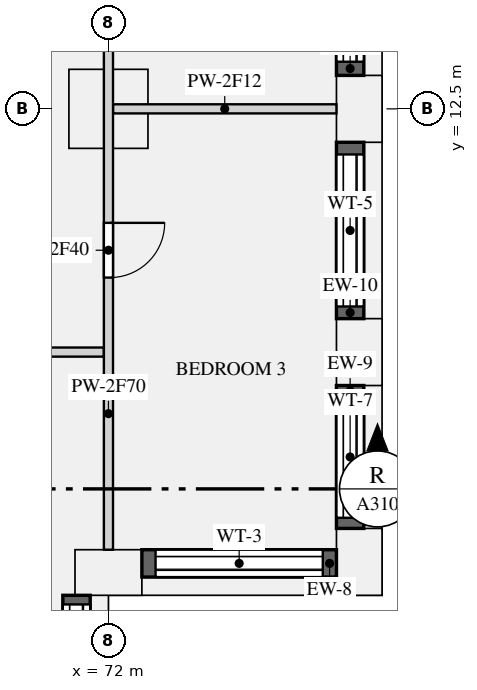
"""IFC4 building model, lengths in metres.
Left out: names, types, materials, properties, quantities, classifications, styles, units other than length and angle.
Written with IfcOpenShell. Run it as: python <this file> out.ifc"""

import sys

from ifc_helpers import new_model, si_unit, direction, frame, frame_2d, origin, origin_2d, place, context, subcontext, project, spatial, rectangle, extrude, element, fill, save


model = new_model("IFC4")
c1 = context("Model", 3, precision=1e-05, world=origin(), true_north=direction((0.0, 1.0)))
c2 = subcontext(c1, "Body", "Model", "MODEL_VIEW")
j1 = project(units=[si_unit("LENGTHUNIT", "METRE"), si_unit("PLANEANGLEUNIT", "RADIAN")], contexts=[c1])
p1 = place(None, origin())
s1 = spatial("IfcSite", under=j1, at=p1, CompositionType="ELEMENT")
p2 = place(p1, origin())
s2 = spatial("IfcBuilding", under=s1, at=p2, CompositionType="ELEMENT")
p3 = place(p2, frame((0.0, 0.0, 127.65)))
s3 = spatial("IfcBuildingStorey", under=s2, at=p3, CompositionType="ELEMENT", Elevation=127.65)
for number, where, z_axis, x_axis in (
    (1, (72.0, 4.875, 0.0), (0.0, 0.0, 1.0), (1.0, 0.0, 0.0)),
    (2, (76.125, 5.05, 0.0), (0.0, 0.0, 1.0), (0.0, 1.0, 0.0)),
    (3, (76.125, 8.5, 0.0), (0.0, 0.0, 1.0), (0.0, 1.0, 0.0)),
    (4, (76.125, 12.5, 0.0), (0.0, 0.0, 1.0), (0.0, 1.0, 0.0)),
):
    element("IfcColumn", number, at=place(p3, frame(where, z_axis=z_axis, x_axis=x_axis)), inside=s3, PredefinedType="USERDEFINED", context=c2, shape_type="SweptSolid", body=[
        extrude(rectangle(XDim=1.1, YDim=0.75, at=origin_2d()), origin(), (0.0, 0.0, 1.0), 3.15),
    ])
p4 = place(p3, frame((72.0, 12.5, 0.0), z_axis=(0.0, 0.0, 1.0), x_axis=(1.0, 0.0, 0.0)))
e5 = element("IfcColumn", 5, at=p4, inside=s3, PredefinedType="COLUMN", context=c2, shape_type="SweptSolid", body=[
    extrude(rectangle(XDim=1.3, YDim=1.3, at=origin_2d()), origin(), (0.0, 0.0, 1.0), 3.15),
])
p5 = place(p3, frame((71.475, 1.1, 0.9), z_axis=(0.0, 0.0, 1.0), x_axis=(0.0, 1.0, 0.0)))
e6 = element("IfcWall", 6, at=p5, inside=s3, PredefinedType="SOLIDWALL", context=c2, shape_type="SweptSolid", body=[
    extrude(rectangle(XDim=3.4, YDim=0.45, at=frame_2d((1.7, 0.0))), origin(), (0.0, 0.0, 1.0), 1.75),
])
p6 = place(p5, frame((0.15, 0.0, 0.15)))
e7 = element("IfcOpeningElement", 7, at=p6, cuts=e6, PredefinedType="OPENING", context=c2, shape_type="SweptSolid", body=[
    extrude(rectangle(XDim=3.1, YDim=1.5, at=frame_2d((1.55, 0.75))), frame((0.0, 0.235, 0.0), z_axis=(0.0, -1.0, 0.0), x_axis=(1.0, 0.0, 0.0)), (0.0, 0.0, 1.0), 0.47),
])
p7 = place(p3, frame((72.55, 5.025, 0.9), z_axis=(0.0, 0.0, 1.0), x_axis=(1.0, 0.0, 0.0)))
e8 = element("IfcWall", 8, at=p7, inside=s3, PredefinedType="SOLIDWALL", context=c2, shape_type="SweptSolid", body=[
    extrude(rectangle(XDim=3.2, YDim=0.45, at=frame_2d((1.6, 0.0))), origin(), (0.0, 0.0, 1.0), 1.75),
])
p8 = place(p7, frame((0.225, 0.0, 0.15)))
e9 = element("IfcOpeningElement", 9, at=p8, cuts=e8, PredefinedType="OPENING", context=c2, shape_type="SweptSolid", body=[
    extrude(rectangle(XDim=2.75, YDim=1.5, at=frame_2d((1.375, 0.75))), frame((0.0, 0.235, 0.0), z_axis=(0.0, -1.0, 0.0), x_axis=(1.0, 0.0, 0.0)), (0.0, 0.0, 1.0), 0.47),
])
p9 = place(p3, frame((75.975, 5.6, 0.9), z_axis=(0.0, 0.0, 1.0), x_axis=(0.0, 1.0, 0.0)))
e10 = element("IfcWall", 10, at=p9, inside=s3, PredefinedType="SOLIDWALL", context=c2, shape_type="SweptSolid", body=[
    extrude(rectangle(XDim=2.35, YDim=0.45, at=frame_2d((1.175, 0.0))), origin(), (0.0, 0.0, 1.0), 1.75),
])
p10 = place(p9, frame((0.175, 0.0, 0.15)))
e11 = element("IfcOpeningElement", 11, at=p10, cuts=e10, PredefinedType="OPENING", context=c2, shape_type="SweptSolid", body=[
    extrude(rectangle(XDim=2.0, YDim=1.5, at=frame_2d((1.0, 0.75))), frame((0.0, 0.235, 0.0), z_axis=(0.0, -1.0, 0.0), x_axis=(1.0, 0.0, 0.0)), (0.0, 0.0, 1.0), 0.47),
])
p11 = place(p3, frame((75.975, 9.05, 0.9), z_axis=(0.0, 0.0, 1.0), x_axis=(0.0, 1.0, 0.0)))
e12 = element("IfcWall", 12, at=p11, inside=s3, PredefinedType="SOLIDWALL", context=c2, shape_type="SweptSolid", body=[
    extrude(rectangle(XDim=2.9, YDim=0.45, at=frame_2d((1.45, 0.0))), origin(), (0.0, 0.0, 1.0), 1.75),
])
p12 = place(p11, frame((0.2, 0.0, 0.15)))
e13 = element("IfcOpeningElement", 13, at=p12, cuts=e12, PredefinedType="OPENING", context=c2, shape_type="SweptSolid", body=[
    extrude(rectangle(XDim=2.5, YDim=1.5, at=frame_2d((1.25, 0.75))), frame((0.0, 0.235, 0.0), z_axis=(0.0, -1.0, 0.0), x_axis=(1.0, 0.0, 0.0)), (0.0, 0.0, 1.0), 0.47),
])
p13 = place(p3, frame((75.975, 13.05, 0.9), z_axis=(0.0, 0.0, 1.0), x_axis=(0.0, 1.0, 0.0)))
e14 = element("IfcWall", 14, at=p13, inside=s3, PredefinedType="SOLIDWALL", context=c2, shape_type="SweptSolid", body=[
    extrude(rectangle(XDim=2.7, YDim=0.45, at=frame_2d((1.35, 0.0))), origin(), (0.0, 0.0, 1.0), 1.75),
])
p14 = place(p13, frame((0.225, 0.0, 0.15)))
e15 = element("IfcOpeningElement", 15, at=p14, cuts=e14, PredefinedType="OPENING", context=c2, shape_type="SweptSolid", body=[
    extrude(rectangle(XDim=2.25, YDim=1.5, at=frame_2d((1.125, 0.75))), frame((0.0, 0.235, 0.0), z_axis=(0.0, -1.0, 0.0), x_axis=(1.0, 0.0, 0.0)), (0.0, 0.0, 1.0), 0.47),
])
p15 = place(p3, frame((72.075, 12.5, 0.0), z_axis=(0.0, 0.0, 1.0), x_axis=(1.0, 0.0, 0.0)))
e16 = element("IfcWall", 16, at=p15, inside=s3, PredefinedType="PARTITIONING", context=c2, shape_type="SweptSolid", body=[
    extrude(rectangle(XDim=3.675, YDim=0.15, at=frame_2d((1.837, 0.0))), origin(), (0.0, 0.0, 1.0), 2.65),
])
p16 = place(p3, frame((54.0, 8.5, 0.0), z_axis=(0.0, 0.0, 1.0), x_axis=(1.0, 0.0, 0.0)))
e17 = element("IfcWall", 17, at=p16, inside=s3, PredefinedType="PARTITIONING", context=c2, shape_type="SweptSolid", body=[
    extrude(rectangle(XDim=17.925, YDim=0.15, at=frame_2d((8.962, 0.0))), origin(), (0.0, 0.0, 1.0), 2.65),
])
p17 = place(p16, frame((1.8, 0.0, 0.0)))
e18 = element("IfcOpeningElement", 18, at=p17, cuts=e17, PredefinedType="OPENING", context=c2, shape_type="SweptSolid", body=[
    extrude(rectangle(XDim=0.9, YDim=2.1, at=frame_2d((0.45, 1.05))), frame((0.0, 0.085, 0.0), z_axis=(0.0, -1.0, 0.0), x_axis=(1.0, 0.0, 0.0)), (0.0, 0.0, 1.0), 0.17),
])
p18 = place(p16, frame((12.75, 0.0, 0.0)))
e19 = element("IfcOpeningElement", 19, at=p18, cuts=e17, PredefinedType="OPENING", context=c2, shape_type="SweptSolid", body=[
    extrude(rectangle(XDim=1.5, YDim=2.1, at=frame_2d((0.75, 1.05))), frame((0.0, 0.085, 0.0), z_axis=(0.0, -1.0, 0.0), x_axis=(1.0, 0.0, 0.0)), (0.0, 0.0, 1.0), 0.17),
])
p19 = place(p16, frame((6.3, 0.0, 0.0)))
e20 = element("IfcOpeningElement", 20, at=p19, cuts=e17, PredefinedType="OPENING", context=c2, shape_type="SweptSolid", body=[
    extrude(rectangle(XDim=0.9, YDim=2.1, at=frame_2d((0.45, 1.05))), frame((0.0, 0.085, 0.0), z_axis=(0.0, -1.0, 0.0), x_axis=(1.0, 0.0, 0.0)), (0.0, 0.0, 1.0), 0.17),
])
p20 = place(p3, frame((72.0, 5.25, 0.0), z_axis=(0.0, 0.0, 1.0), x_axis=(0.0, 1.0, 0.0)))
e21 = element("IfcWall", 21, at=p20, inside=s3, PredefinedType="PARTITIONING", context=c2, shape_type="SweptSolid", body=[
    extrude(rectangle(XDim=11.175, YDim=0.15, at=frame_2d((5.587, 0.0))), origin(), (0.0, 0.0, 1.0), 2.65),
])
p21 = place(p20, frame((4.475, 0.0, 0.0)))
e22 = element("IfcOpeningElement", 22, at=p21, cuts=e21, PredefinedType="OPENING", context=c2, shape_type="SweptSolid", body=[
    extrude(rectangle(XDim=0.9, YDim=2.1, at=frame_2d((0.45, 1.05))), frame((0.0, 0.085, 0.0), z_axis=(0.0, -1.0, 0.0), x_axis=(1.0, 0.0, 0.0)), (0.0, 0.0, 1.0), 0.17),
])
p22 = place(p20, frame((9.125, 0.0, 0.0)))
e23 = element("IfcOpeningElement", 23, at=p22, cuts=e21, PredefinedType="OPENING", context=c2, shape_type="SweptSolid", body=[
    extrude(rectangle(XDim=0.9, YDim=2.1, at=frame_2d((0.45, 1.05))), frame((0.0, 0.085, 0.0), z_axis=(0.0, -1.0, 0.0), x_axis=(1.0, 0.0, 0.0)), (0.0, 0.0, 1.0), 0.17),
])
p23 = place(p6, origin())
e24 = element("IfcWindow", 24, at=p23, inside=s3, PartitioningType="SINGLE_PANEL", PredefinedType="WINDOW", context=c2, shape_type="SweptSolid", body=[
    extrude(rectangle(XDim=3.1, YDim=1.5, at=frame_2d((1.55, 0.75))), frame((0.0, -0.065, 0.0), z_axis=(0.0, -1.0, 0.0), x_axis=(1.0, 0.0, 0.0)), (0.0, 0.0, 1.0), 0.06),
])
fill(e7, e24)
p24 = place(p8, origin())
e25 = element("IfcWindow", 25, at=p24, inside=s3, PartitioningType="SINGLE_PANEL", PredefinedType="WINDOW", context=c2, shape_type="SweptSolid", body=[
    extrude(rectangle(XDim=2.75, YDim=1.5, at=frame_2d((1.375, 0.75))), frame((0.0, -0.065, 0.0), z_axis=(0.0, -1.0, 0.0), x_axis=(1.0, 0.0, 0.0)), (0.0, 0.0, 1.0), 0.06),
])
fill(e9, e25)
p25 = place(p10, origin())
e26 = element("IfcWindow", 26, at=p25, inside=s3, PartitioningType="SINGLE_PANEL", PredefinedType="WINDOW", context=c2, shape_type="SweptSolid", body=[
    extrude(rectangle(XDim=2.0, YDim=1.5, at=frame_2d((1.0, 0.75))), frame((0.0, -0.065, 0.0), z_axis=(0.0, -1.0, 0.0), x_axis=(1.0, 0.0, 0.0)), (0.0, 0.0, 1.0), 0.06),
])
fill(e11, e26)
p26 = place(p12, origin())
e27 = element("IfcWindow", 27, at=p26, inside=s3, PartitioningType="SINGLE_PANEL", PredefinedType="WINDOW", context=c2, shape_type="SweptSolid", body=[
    extrude(rectangle(XDim=2.5, YDim=1.5, at=frame_2d((1.25, 0.75))), frame((0.0, -0.065, 0.0), z_axis=(0.0, -1.0, 0.0), x_axis=(1.0, 0.0, 0.0)), (0.0, 0.0, 1.0), 0.06),
])
fill(e13, e27)
p27 = place(p14, origin())
e28 = element("IfcWindow", 28, at=p27, inside=s3, PartitioningType="SINGLE_PANEL", PredefinedType="WINDOW", context=c2, shape_type="SweptSolid", body=[
    extrude(rectangle(XDim=2.25, YDim=1.5, at=frame_2d((1.125, 0.75))), frame((0.0, -0.065, 0.0), z_axis=(0.0, -1.0, 0.0), x_axis=(1.0, 0.0, 0.0)), (0.0, 0.0, 1.0), 0.06),
])
fill(e15, e28)
p28 = place(p21, frame((0.9, 0.0, 0.0), z_axis=(0.0, 0.0, 1.0), x_axis=(-1.0, 0.0, 0.0)))
e29 = element("IfcDoor", 29, at=p28, inside=s3, OperationType="SINGLE_SWING_LEFT", PredefinedType="DOOR", context=c2, shape_type="SweptSolid", body=[
    extrude(rectangle(XDim=0.9, YDim=2.1, at=frame_2d((0.45, 1.05))), frame((0.0, 0.025, 0.0), z_axis=(0.0, -1.0, 0.0), x_axis=(1.0, 0.0, 0.0)), (0.0, 0.0, 1.0), 0.05),
])
fill(e22, e29)
save(model, sys.argv[1])
